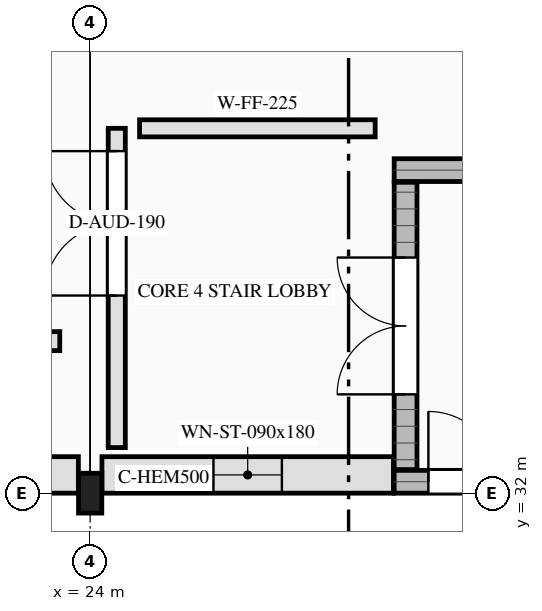
"""IFC4 building model, lengths in metres.
Left out: names, types, materials, properties, quantities, classifications, styles, units other than length and angle.
Written with IfcOpenShell. Run it as: python <this file> out.ifc"""

import sys

from ifc_helpers import new_model, si_unit, direction, frame, frame_2d, origin, origin_2d, place, context, subcontext, project, spatial, rectangle, i_section, extrude, element, fill, save


model = new_model("IFC4")
c1 = context("Model", 3, precision=1e-05, world=origin(), true_north=direction((0.0, 1.0)))
c2 = subcontext(c1, "Body", "Model", "MODEL_VIEW")
j1 = project(units=[si_unit("LENGTHUNIT", "METRE"), si_unit("PLANEANGLEUNIT", "RADIAN")], contexts=[c1])
p1 = place(None, origin())
s1 = spatial("IfcSite", under=j1, at=p1, CompositionType="ELEMENT")
p2 = place(p1, origin())
s2 = spatial("IfcBuilding", under=s1, at=p2, CompositionType="ELEMENT")
p3 = place(p2, origin())
s3 = spatial("IfcBuildingStorey", under=s2, at=p3, CompositionType="ELEMENT", Elevation=0.0)
p4 = place(p3, frame((28.0, 32.15, 0.0), z_axis=(0.0, 0.0, 1.0), x_axis=(1.0, 0.0, 0.0)))
e1 = element("IfcWall", 1, at=p4, inside=s3, PredefinedType="SHEAR", context=c2, shape_type="SweptSolid", body=[
    extrude(rectangle(XDim=10.0, YDim=0.3, at=frame_2d((5.0, 0.0))), origin(), (0.0, 0.0, 1.0), 5.4),
])
p5 = place(p4, frame((0.45, 0.0, 0.0)))
e2 = element("IfcOpeningElement", 2, at=p5, cuts=e1, PredefinedType="OPENING", context=c2, shape_type="SweptSolid", body=[
    extrude(rectangle(XDim=1.85, YDim=2.3, at=frame_2d((0.925, 1.15))), frame((0.0, 0.16, 0.0), z_axis=(0.0, -1.0, 0.0), x_axis=(1.0, 0.0, 0.0)), (0.0, 0.0, 1.0), 0.32),
])
p6 = place(p3, frame((28.0, 36.25, 0.0), z_axis=(0.0, 0.0, 1.0), x_axis=(1.0, 0.0, 0.0)))
e3 = element("IfcWall", 3, at=p6, inside=s3, PredefinedType="SHEAR", context=c2, shape_type="SweptSolid", body=[
    extrude(rectangle(XDim=10.0, YDim=0.3, at=frame_2d((5.0, 0.0))), origin(), (0.0, 0.0, 1.0), 5.4),
])
p7 = place(p3, frame((28.15, 32.31, 0.0), z_axis=(0.0, 0.0, 1.0), x_axis=(0.0, 1.0, 0.0)))
e4 = element("IfcWall", 4, at=p7, inside=s3, PredefinedType="SHEAR", context=c2, shape_type="SweptSolid", body=[
    extrude(rectangle(XDim=3.78, YDim=0.3, at=frame_2d((1.89, 0.0))), origin(), (0.0, 0.0, 1.0), 5.4),
])
p8 = place(p7, frame((0.99, 0.0, 0.0)))
e5 = element("IfcOpeningElement", 5, at=p8, cuts=e4, PredefinedType="OPENING", context=c2, shape_type="SweptSolid", body=[
    extrude(rectangle(XDim=1.8, YDim=2.2, at=frame_2d((0.9, 1.1))), frame((0.0, 0.16, 0.0), z_axis=(0.0, -1.0, 0.0), x_axis=(1.0, 0.0, 0.0)), (0.0, 0.0, 1.0), 0.32),
])
p9 = place(p3, frame((24.0, 32.0, 0.0), z_axis=(0.0, 0.0, 1.0), x_axis=(1.0, 0.0, 0.0)))
e6 = element("IfcColumn", 6, at=p9, inside=s3, PredefinedType="COLUMN", context=c2, shape_type="SweptSolid", body=[
    extrude(i_section(OverallWidth=0.306, OverallDepth=0.524, WebThickness=0.021, FlangeThickness=0.04, FilletRadius=0.027, at=origin_2d()), origin(), (0.0, 0.0, 1.0), 5.4),
])
p10 = place(p3, frame((23.845, 32.24, 0.0), z_axis=(0.0, 0.0, 1.0), x_axis=(-1.0, 0.0, 0.0)))
e7 = element("IfcWall", 7, at=p10, inside=s3, PredefinedType="SOLIDWALL", context=c2, shape_type="SweptSolid", body=[
    extrude(rectangle(XDim=7.691, YDim=0.48, at=frame_2d((3.845, 0.0))), origin(), (0.0, 0.0, 1.0), 4.835),
])
p11 = place(p10, frame((2.696, 0.0, 0.85)))
e8 = element("IfcOpeningElement", 8, at=p11, cuts=e7, PredefinedType="OPENING", context=c2, shape_type="SweptSolid", body=[
    extrude(rectangle(XDim=2.3, YDim=2.2, at=frame_2d((1.15, 1.1))), frame((0.0, 0.25, 0.0), z_axis=(0.0, -1.0, 0.0), x_axis=(1.0, 0.0, 0.0)), (0.0, 0.0, 1.0), 0.5),
])
p12 = place(p3, frame((27.99, 32.24, 0.0), z_axis=(0.0, 0.0, 1.0), x_axis=(-1.0, 0.0, 0.0)))
e9 = element("IfcWall", 9, at=p12, inside=s3, PredefinedType="SOLIDWALL", context=c2, shape_type="SweptSolid", body=[
    extrude(rectangle(XDim=3.835, YDim=0.48, at=frame_2d((1.917, 0.0))), origin(), (0.0, 0.0, 1.0), 4.835),
])
p13 = place(p12, frame((1.468, 0.0, 0.85)))
e10 = element("IfcOpeningElement", 10, at=p13, cuts=e9, PredefinedType="OPENING", context=c2, shape_type="SweptSolid", body=[
    extrude(rectangle(XDim=0.9, YDim=1.8, at=frame_2d((0.45, 0.9))), frame((0.0, 0.25, 0.0), z_axis=(0.0, -1.0, 0.0), x_axis=(1.0, 0.0, 0.0)), (0.0, 0.0, 1.0), 0.5),
])
p14 = place(p3, frame((16.4, 34.0, 0.0), z_axis=(0.0, 0.0, 1.0), x_axis=(1.0, 0.0, 0.0)))
e11 = element("IfcWall", 11, at=p14, inside=s3, PredefinedType="PARAPET", context=c2, shape_type="SweptSolid", body=[
    extrude(rectangle(XDim=7.2, YDim=0.25, at=frame_2d((3.6, 0.0))), origin(), (0.0, 0.0, 1.0), 2.55),
])
p15 = place(p14, frame((2.6, 0.0, 0.0)))
e12 = element("IfcOpeningElement", 12, at=p15, cuts=e11, PredefinedType="OPENING", context=c2, shape_type="SweptSolid", body=[
    extrude(rectangle(XDim=2.0, YDim=2.15, at=frame_2d((1.0, 1.075))), frame((0.0, 0.135, 0.0), z_axis=(0.0, -1.0, 0.0), x_axis=(1.0, 0.0, 0.0)), (0.0, 0.0, 1.0), 0.27),
])
p16 = place(p3, frame((24.35, 32.6, 0.0), z_axis=(0.0, 0.0, 1.0), x_axis=(0.0, 1.0, 0.0)))
e13 = element("IfcWall", 13, at=p16, inside=s3, PredefinedType="SOLIDWALL", context=c2, shape_type="SweptSolid", body=[
    extrude(rectangle(XDim=4.2, YDim=0.225, at=frame_2d((2.1, 0.0))), origin(), (0.0, 0.0, 1.0), 5.16),
])
p17 = place(p16, frame((2.0, 0.0, 0.0)))
e14 = element("IfcOpeningElement", 14, at=p17, cuts=e13, PredefinedType="OPENING", context=c2, shape_type="SweptSolid", body=[
    extrude(rectangle(XDim=1.9, YDim=2.35, at=frame_2d((0.95, 1.175))), frame((0.0, 0.123, 0.0), z_axis=(0.0, -1.0, 0.0), x_axis=(1.0, 0.0, 0.0)), (0.0, 0.0, 1.0), 0.245),
])
p18 = place(p3, frame((24.65, 36.8, 0.0), z_axis=(0.0, 0.0, 1.0), x_axis=(1.0, 0.0, 0.0)))
e15 = element("IfcWall", 15, at=p18, inside=s3, PredefinedType="SOLIDWALL", context=c2, shape_type="SweptSolid", body=[
    extrude(rectangle(XDim=3.1, YDim=0.225, at=frame_2d((1.55, 0.0))), origin(), (0.0, 0.0, 1.0), 5.16),
])
p19 = place(p13, origin())
e16 = element("IfcWindow", 16, at=p19, inside=s3, PartitioningType="SINGLE_PANEL", PredefinedType="WINDOW", context=c2, shape_type="SweptSolid", body=[
    extrude(rectangle(XDim=0.9, YDim=1.8, at=frame_2d((0.45, 0.9))), frame((0.0, 0.03, 0.0), z_axis=(0.0, -1.0, 0.0), x_axis=(1.0, 0.0, 0.0)), (0.0, 0.0, 1.0), 0.06),
])
fill(e10, e16)
p20 = place(p5, origin())
e17 = element("IfcDoor", 17, at=p20, inside=s3, OperationType="DOUBLE_DOOR_SINGLE_SWING", PredefinedType="DOOR", context=c2, shape_type="SweptSolid", body=[
    extrude(rectangle(XDim=1.85, YDim=2.3, at=frame_2d((0.925, 1.15))), frame((0.0, 0.025, 0.0), z_axis=(0.0, -1.0, 0.0), x_axis=(1.0, 0.0, 0.0)), (0.0, 0.0, 1.0), 0.05),
])
fill(e2, e17)
p21 = place(p8, origin())
e18 = element("IfcDoor", 18, at=p21, inside=s3, OperationType="DOUBLE_DOOR_SINGLE_SWING", PredefinedType="DOOR", context=c2, shape_type="SweptSolid", body=[
    extrude(rectangle(XDim=1.8, YDim=2.2, at=frame_2d((0.9, 1.1))), frame((0.0, 0.025, 0.0), z_axis=(0.0, -1.0, 0.0), x_axis=(1.0, 0.0, 0.0)), (0.0, 0.0, 1.0), 0.05),
])
fill(e5, e18)
p22 = place(p17, origin())
e19 = element("IfcDoor", 19, at=p22, inside=s3, OperationType="DOUBLE_DOOR_SINGLE_SWING", PredefinedType="DOOR", context=c2, shape_type="SweptSolid", body=[
    extrude(rectangle(XDim=1.9, YDim=2.35, at=frame_2d((0.95, 1.175))), frame((0.0, 0.025, 0.0), z_axis=(0.0, -1.0, 0.0), x_axis=(1.0, 0.0, 0.0)), (0.0, 0.0, 1.0), 0.05),
])
fill(e14, e19)
save(model, sys.argv[1])
